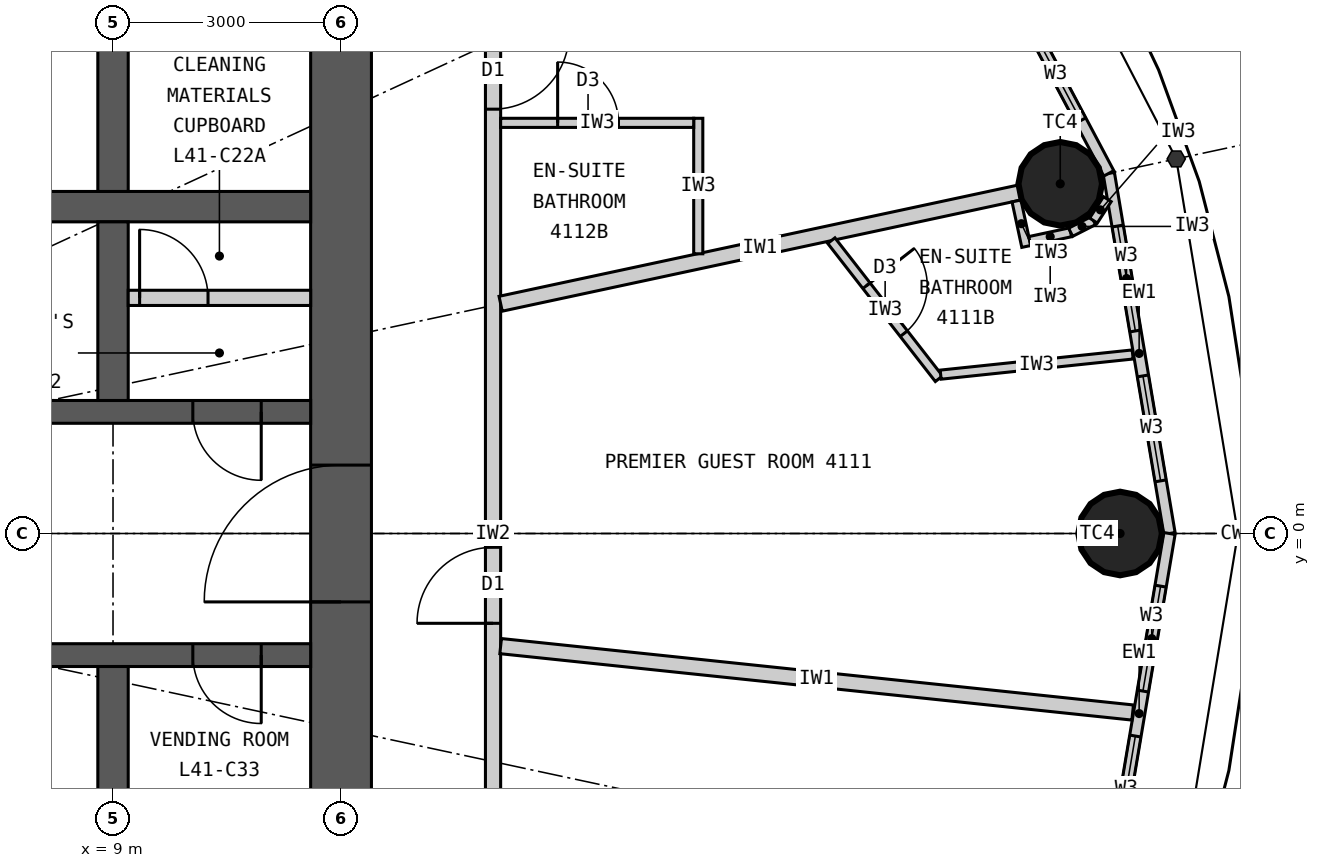
"""IFC4 building model, lengths in metres.
Left out: names, types, materials, properties, quantities, classifications, styles, units other than length and angle.
Written with IfcOpenShell. Run it as: python <this file> out.ifc"""

import sys

from ifc_helpers import new_model, si_unit, direction, frame, frame_2d, origin, origin_2d, place, context, subcontext, project, spatial, rectangle, circle, extrude, element, fill, save


model = new_model("IFC4")
c1 = context("Model", 3, precision=1e-05, world=origin(), true_north=direction((0.0, 1.0)))
c2 = subcontext(c1, "Body", "Model", "MODEL_VIEW")
j1 = project(units=[si_unit("LENGTHUNIT", "METRE"), si_unit("PLANEANGLEUNIT", "RADIAN")], contexts=[c1])
p1 = place(None, origin())
s1 = spatial("IfcSite", under=j1, at=p1, CompositionType="ELEMENT")
p2 = place(p1, origin())
s2 = spatial("IfcBuilding", under=s1, at=p2, CompositionType="ELEMENT")
p3 = place(p2, frame((0.0, 0.0, 156.6)))
s3 = spatial("IfcBuildingStorey", under=s2, at=p3, CompositionType="ELEMENT", Elevation=156.6)
for number, where, z_axis, x_axis in (
    (1, (22.25, 0.0, 0.0), (0.0, 0.0, 1.0), (1.0, 0.0, 0.0)),
    (2, (21.463, 4.601, 0.0), (0.0, 0.0, 1.0), (1.0, 0.0, 0.0)),
):
    element("IfcColumn", number, at=place(p3, frame(where, z_axis=z_axis, x_axis=x_axis)), inside=s3, PredefinedType="COLUMN", context=c2, shape_type="SweptSolid", body=[
        extrude(circle(Radius=0.55, at=origin_2d()), origin(), (0.0, 0.0, 1.0), 3.3),
    ])
p4 = place(p3, frame((12.0, -7.6, 0.0), z_axis=(0.0, 0.0, 1.0), x_axis=(0.0, 1.0, 0.0)))
e3 = element("IfcWall", 3, at=p4, inside=s3, PredefinedType="SHEAR", context=c2, shape_type="SweptSolid", body=[
    extrude(rectangle(XDim=15.2, YDim=0.8, at=frame_2d((7.6, 0.0))), origin(), (0.0, 0.0, 1.0), 3.3),
])
p5 = place(p4, frame((6.7, 0.0, 0.0)))
e4 = element("IfcOpeningElement", 4, at=p5, cuts=e3, PredefinedType="OPENING", context=c2, shape_type="SweptSolid", body=[
    extrude(rectangle(XDim=1.8, YDim=2.2, at=frame_2d((0.9, 1.1))), frame((0.0, 0.41, 0.0), z_axis=(0.0, -1.0, 0.0), x_axis=(1.0, 0.0, 0.0)), (0.0, 0.0, 1.0), 0.82),
])
p6 = place(p3, frame((-11.6, 4.3, 0.0), z_axis=(0.0, 0.0, 1.0), x_axis=(1.0, 0.0, 0.0)))
e5 = element("IfcWall", 5, at=p6, inside=s3, PredefinedType="SHEAR", context=c2, shape_type="SweptSolid", body=[
    extrude(rectangle(XDim=23.2, YDim=0.4, at=frame_2d((11.6, 0.0))), origin(), (0.0, 0.0, 1.0), 3.3),
])
p7 = place(p3, frame((-11.6, 1.6, 0.0), z_axis=(0.0, 0.0, 1.0), x_axis=(1.0, 0.0, 0.0)))
e6 = element("IfcWall", 6, at=p7, inside=s3, PredefinedType="SHEAR", context=c2, shape_type="SweptSolid", body=[
    extrude(rectangle(XDim=23.2, YDim=0.3, at=frame_2d((11.6, 0.0))), origin(), (0.0, 0.0, 1.0), 3.3),
])
p8 = place(p7, frame((9.55, 0.0, 0.0)))
e7 = element("IfcOpeningElement", 7, at=p8, cuts=e6, PredefinedType="OPENING", context=c2, shape_type="SweptSolid", body=[
    extrude(rectangle(XDim=1.1, YDim=2.2, at=frame_2d((0.55, 1.1))), frame((0.0, 0.16, 0.0), z_axis=(0.0, -1.0, 0.0), x_axis=(1.0, 0.0, 0.0)), (0.0, 0.0, 1.0), 0.32),
])
p9 = place(p7, frame((12.55, 0.0, 0.0)))
e8 = element("IfcOpeningElement", 8, at=p9, cuts=e6, PredefinedType="OPENING", context=c2, shape_type="SweptSolid", body=[
    extrude(rectangle(XDim=1.1, YDim=2.2, at=frame_2d((0.55, 1.1))), frame((0.0, 0.16, 0.0), z_axis=(0.0, -1.0, 0.0), x_axis=(1.0, 0.0, 0.0)), (0.0, 0.0, 1.0), 0.32),
])
p10 = place(p7, frame((0.65, 0.0, 0.0)))
e9 = element("IfcOpeningElement", 9, at=p10, cuts=e6, PredefinedType="OPENING", context=c2, shape_type="SweptSolid", body=[
    extrude(rectangle(XDim=0.9, YDim=2.2, at=frame_2d((0.45, 1.1))), frame((0.0, 0.16, 0.0), z_axis=(0.0, -1.0, 0.0), x_axis=(1.0, 0.0, 0.0)), (0.0, 0.0, 1.0), 0.32),
])
p11 = place(p7, frame((21.65, 0.0, 0.0)))
e10 = element("IfcOpeningElement", 10, at=p11, cuts=e6, PredefinedType="OPENING", context=c2, shape_type="SweptSolid", body=[
    extrude(rectangle(XDim=0.9, YDim=2.2, at=frame_2d((0.45, 1.1))), frame((0.0, 0.16, 0.0), z_axis=(0.0, -1.0, 0.0), x_axis=(1.0, 0.0, 0.0)), (0.0, 0.0, 1.0), 0.32),
])
p12 = place(p7, frame((3.65, 0.0, 0.0)))
e11 = element("IfcOpeningElement", 11, at=p12, cuts=e6, PredefinedType="OPENING", context=c2, shape_type="SweptSolid", body=[
    extrude(rectangle(XDim=0.9, YDim=2.2, at=frame_2d((0.45, 1.1))), frame((0.0, 0.16, 0.0), z_axis=(0.0, -1.0, 0.0), x_axis=(1.0, 0.0, 0.0)), (0.0, 0.0, 1.0), 0.32),
])
p13 = place(p7, frame((6.65, 0.0, 0.0)))
e12 = element("IfcOpeningElement", 12, at=p13, cuts=e6, PredefinedType="OPENING", context=c2, shape_type="SweptSolid", body=[
    extrude(rectangle(XDim=0.9, YDim=2.2, at=frame_2d((0.45, 1.1))), frame((0.0, 0.16, 0.0), z_axis=(0.0, -1.0, 0.0), x_axis=(1.0, 0.0, 0.0)), (0.0, 0.0, 1.0), 0.32),
])
p14 = place(p3, frame((-11.6, -1.6, 0.0), z_axis=(0.0, 0.0, 1.0), x_axis=(1.0, 0.0, 0.0)))
e13 = element("IfcWall", 13, at=p14, inside=s3, PredefinedType="SHEAR", context=c2, shape_type="SweptSolid", body=[
    extrude(rectangle(XDim=23.2, YDim=0.3, at=frame_2d((11.6, 0.0))), origin(), (0.0, 0.0, 1.0), 3.3),
])
p15 = place(p14, frame((9.55, 0.0, 0.0)))
e14 = element("IfcOpeningElement", 14, at=p15, cuts=e13, PredefinedType="OPENING", context=c2, shape_type="SweptSolid", body=[
    extrude(rectangle(XDim=1.1, YDim=2.2, at=frame_2d((0.55, 1.1))), frame((0.0, 0.16, 0.0), z_axis=(0.0, -1.0, 0.0), x_axis=(1.0, 0.0, 0.0)), (0.0, 0.0, 1.0), 0.32),
])
p16 = place(p14, frame((15.3, 0.0, 0.0)))
e15 = element("IfcOpeningElement", 15, at=p16, cuts=e13, PredefinedType="OPENING", context=c2, shape_type="SweptSolid", body=[
    extrude(rectangle(XDim=1.6, YDim=2.4, at=frame_2d((0.8, 1.2))), frame((0.0, 0.16, 0.0), z_axis=(0.0, -1.0, 0.0), x_axis=(1.0, 0.0, 0.0)), (0.0, 0.0, 1.0), 0.32),
])
p17 = place(p14, frame((0.65, 0.0, 0.0)))
e16 = element("IfcOpeningElement", 16, at=p17, cuts=e13, PredefinedType="OPENING", context=c2, shape_type="SweptSolid", body=[
    extrude(rectangle(XDim=0.9, YDim=2.2, at=frame_2d((0.45, 1.1))), frame((0.0, 0.16, 0.0), z_axis=(0.0, -1.0, 0.0), x_axis=(1.0, 0.0, 0.0)), (0.0, 0.0, 1.0), 0.32),
])
p18 = place(p14, frame((5.15, 0.0, 0.0)))
e17 = element("IfcOpeningElement", 17, at=p18, cuts=e13, PredefinedType="OPENING", context=c2, shape_type="SweptSolid", body=[
    extrude(rectangle(XDim=0.9, YDim=2.2, at=frame_2d((0.45, 1.1))), frame((0.0, 0.16, 0.0), z_axis=(0.0, -1.0, 0.0), x_axis=(1.0, 0.0, 0.0)), (0.0, 0.0, 1.0), 0.32),
])
p19 = place(p14, frame((21.65, 0.0, 0.0)))
e18 = element("IfcOpeningElement", 18, at=p19, cuts=e13, PredefinedType="OPENING", context=c2, shape_type="SweptSolid", body=[
    extrude(rectangle(XDim=0.9, YDim=2.2, at=frame_2d((0.45, 1.1))), frame((0.0, 0.16, 0.0), z_axis=(0.0, -1.0, 0.0), x_axis=(1.0, 0.0, 0.0)), (0.0, 0.0, 1.0), 0.32),
])
p20 = place(p3, frame((9.0, 4.5, 0.0), z_axis=(0.0, 0.0, 1.0), x_axis=(0.0, 1.0, 0.0)))
e19 = element("IfcWall", 19, at=p20, inside=s3, PredefinedType="SHEAR", context=c2, shape_type="SweptSolid", body=[
    extrude(rectangle(XDim=3.1, YDim=0.4, at=frame_2d((1.55, 0.0))), origin(), (0.0, 0.0, 1.0), 3.3),
])
for number, where, z_axis, x_axis in (
    (20, (9.0, 1.75, 0.0), (0.0, 0.0, 1.0), (0.0, 1.0, 0.0)),
    (21, (9.0, -4.1, 0.0), (0.0, 0.0, 1.0), (0.0, 1.0, 0.0)),
):
    element("IfcWall", number, at=place(p3, frame(where, z_axis=z_axis, x_axis=x_axis)), inside=s3, PredefinedType="SHEAR", context=c2, shape_type="SweptSolid", body=[
        extrude(rectangle(XDim=2.35, YDim=0.4, at=frame_2d((1.175, 0.0))), origin(), (0.0, 0.0, 1.0), 3.3),
    ])
p21 = place(p3, frame((22.9, 0.0, 0.0), z_axis=(0.0, 0.0, 1.0), x_axis=(-0.166162111254, 0.986098449843, 0.0)))
e22 = element("IfcWall", 22, at=p21, inside=s3, PredefinedType="ELEMENTEDWALL", context=c2, shape_type="SweptSolid", body=[
    extrude(rectangle(XDim=4.805, YDim=0.15, at=frame_2d((2.402, 0.0))), origin(), (0.0, 0.0, 1.0), 3.12),
])
p22 = place(p21, frame((0.702, 0.0, 0.9)))
e23 = element("IfcOpeningElement", 23, at=p22, cuts=e22, PredefinedType="OPENING", context=c2, shape_type="SweptSolid", body=[
    extrude(rectangle(XDim=1.4, YDim=1.9, at=frame_2d((0.7, 0.95))), frame((0.0, 0.085, 0.0), z_axis=(0.0, -1.0, 0.0), x_axis=(1.0, 0.0, 0.0)), (0.0, 0.0, 1.0), 0.17),
])
p23 = place(p21, frame((2.702, 0.0, 0.9)))
e24 = element("IfcOpeningElement", 24, at=p23, cuts=e22, PredefinedType="OPENING", context=c2, shape_type="SweptSolid", body=[
    extrude(rectangle(XDim=1.4, YDim=1.9, at=frame_2d((0.7, 0.95))), frame((0.0, 0.085, 0.0), z_axis=(0.0, -1.0, 0.0), x_axis=(1.0, 0.0, 0.0)), (0.0, 0.0, 1.0), 0.17),
])
p24 = place(p3, frame((22.102, 4.738, 0.0), z_axis=(0.0, 0.0, 1.0), x_axis=(-0.468428906714, 0.883501193748, 0.0)))
e25 = element("IfcWall", 25, at=p24, inside=s3, PredefinedType="ELEMENTEDWALL", context=c2, shape_type="SweptSolid", body=[
    extrude(rectangle(XDim=4.974, YDim=0.15, at=frame_2d((2.487, 0.0))), origin(), (0.0, 0.0, 1.0), 3.12),
])
p25 = place(p24, frame((0.787, 0.0, 0.9)))
e26 = element("IfcOpeningElement", 26, at=p25, cuts=e25, PredefinedType="OPENING", context=c2, shape_type="SweptSolid", body=[
    extrude(rectangle(XDim=1.4, YDim=1.9, at=frame_2d((0.7, 0.95))), frame((0.0, 0.085, 0.0), z_axis=(0.0, -1.0, 0.0), x_axis=(1.0, 0.0, 0.0)), (0.0, 0.0, 1.0), 0.17),
])
p26 = place(p24, frame((2.787, 0.0, 0.9)))
e27 = element("IfcOpeningElement", 27, at=p26, cuts=e25, PredefinedType="OPENING", context=c2, shape_type="SweptSolid", body=[
    extrude(rectangle(XDim=1.4, YDim=1.9, at=frame_2d((0.7, 0.95))), frame((0.0, 0.085, 0.0), z_axis=(0.0, -1.0, 0.0), x_axis=(1.0, 0.0, 0.0)), (0.0, 0.0, 1.0), 0.17),
])
p27 = place(p3, frame((22.102, -4.738, 0.0), z_axis=(0.0, 0.0, 1.0), x_axis=(0.166162111254, 0.986098449843, 0.0)))
e28 = element("IfcWall", 28, at=p27, inside=s3, PredefinedType="ELEMENTEDWALL", context=c2, shape_type="SweptSolid", body=[
    extrude(rectangle(XDim=4.805, YDim=0.15, at=frame_2d((2.402, 0.0))), origin(), (0.0, 0.0, 1.0), 3.12),
])
p28 = place(p27, frame((0.702, 0.0, 0.9)))
e29 = element("IfcOpeningElement", 29, at=p28, cuts=e28, PredefinedType="OPENING", context=c2, shape_type="SweptSolid", body=[
    extrude(rectangle(XDim=1.4, YDim=1.9, at=frame_2d((0.7, 0.95))), frame((0.0, 0.085, 0.0), z_axis=(0.0, -1.0, 0.0), x_axis=(1.0, 0.0, 0.0)), (0.0, 0.0, 1.0), 0.17),
])
p29 = place(p27, frame((2.702, 0.0, 0.9)))
e30 = element("IfcOpeningElement", 30, at=p29, cuts=e28, PredefinedType="OPENING", context=c2, shape_type="SweptSolid", body=[
    extrude(rectangle(XDim=1.4, YDim=1.9, at=frame_2d((0.7, 0.95))), frame((0.0, 0.085, 0.0), z_axis=(0.0, -1.0, 0.0), x_axis=(1.0, 0.0, 0.0)), (0.0, 0.0, 1.0), 0.17),
])
p30 = place(p3, frame((14.0, -9.9, 0.0), z_axis=(0.0, 0.0, 1.0), x_axis=(0.0, 1.0, 0.0)))
e31 = element("IfcWall", 31, at=p30, inside=s3, PredefinedType="PARTITIONING", context=c2, shape_type="SweptSolid", body=[
    extrude(rectangle(XDim=19.8, YDim=0.2, at=frame_2d((9.9, 0.0))), origin(), (0.0, 0.0, 1.0), 3.12),
])
p31 = place(p30, frame((3.824, 0.0, 0.0)))
e32 = element("IfcOpeningElement", 32, at=p31, cuts=e31, PredefinedType="OPENING", context=c2, shape_type="SweptSolid", body=[
    extrude(rectangle(XDim=1.0, YDim=2.2, at=frame_2d((0.5, 1.1))), frame((0.0, 0.11, 0.0), z_axis=(0.0, -1.0, 0.0), x_axis=(1.0, 0.0, 0.0)), (0.0, 0.0, 1.0), 0.22),
])
p32 = place(p30, frame((8.719, 0.0, 0.0)))
e33 = element("IfcOpeningElement", 33, at=p32, cuts=e31, PredefinedType="OPENING", context=c2, shape_type="SweptSolid", body=[
    extrude(rectangle(XDim=1.0, YDim=2.2, at=frame_2d((0.5, 1.1))), frame((0.0, 0.11, 0.0), z_axis=(0.0, -1.0, 0.0), x_axis=(1.0, 0.0, 0.0)), (0.0, 0.0, 1.0), 0.22),
])
p33 = place(p30, frame((15.482, 0.0, 0.0)))
e34 = element("IfcOpeningElement", 34, at=p33, cuts=e31, PredefinedType="OPENING", context=c2, shape_type="SweptSolid", body=[
    extrude(rectangle(XDim=1.0, YDim=2.2, at=frame_2d((0.5, 1.1))), frame((0.0, 0.11, 0.0), z_axis=(0.0, -1.0, 0.0), x_axis=(1.0, 0.0, 0.0)), (0.0, 0.0, 1.0), 0.22),
])
p34 = place(p3, frame((14.1, 3.022, 0.0), z_axis=(0.0, 0.0, 1.0), x_axis=(0.977790639684, 0.209584028367, 0.0)))
e35 = element("IfcWall", 35, at=p34, inside=s3, PredefinedType="PARTITIONING", context=c2, shape_type="SweptSolid", body=[
    extrude(rectangle(XDim=6.98, YDim=0.2, at=frame_2d((3.49, 0.0))), origin(), (0.0, 0.0, 1.0), 2.42),
])
p35 = place(p3, frame((14.1, -1.481, 0.0), z_axis=(0.0, 0.0, 1.0), x_axis=(0.994524794819, -0.104500873159, 0.0)))
e36 = element("IfcWall", 36, at=p35, inside=s3, PredefinedType="PARTITIONING", context=c2, shape_type="SweptSolid", body=[
    extrude(rectangle(XDim=8.362, YDim=0.2, at=frame_2d((4.181, 0.0))), origin(), (0.0, 0.0, 1.0), 2.47),
])
p36 = place(p3, frame((18.451, 3.853, 0.0), z_axis=(0.0, 0.0, 1.0), x_axis=(0.614703538382, -0.788758239197, 0.0)))
e37 = element("IfcWall", 37, at=p36, inside=s3, PredefinedType="PARTITIONING", context=c2, shape_type="SweptSolid", body=[
    extrude(rectangle(XDim=2.303, YDim=0.12, at=frame_2d((1.152, 0.0))), origin(), (0.0, 0.0, 1.0), 3.12),
])
p37 = place(p36, frame((0.752, 0.0, 0.0)))
e38 = element("IfcOpeningElement", 38, at=p37, cuts=e37, PredefinedType="OPENING", context=c2, shape_type="SweptSolid", body=[
    extrude(rectangle(XDim=0.8, YDim=2.1, at=frame_2d((0.4, 1.05))), frame((0.0, 0.07, 0.0), z_axis=(0.0, -1.0, 0.0), x_axis=(1.0, 0.0, 0.0)), (0.0, 0.0, 1.0), 0.14),
])
p38 = place(p3, frame((19.89, 2.09, 0.0), z_axis=(0.0, 0.0, 1.0), x_axis=(0.994527025269, 0.104479644, 0.0)))
e39 = element("IfcWall", 39, at=p38, inside=s3, PredefinedType="PARTITIONING", context=c2, shape_type="SweptSolid", body=[
    extrude(rectangle(XDim=2.54, YDim=0.12, at=frame_2d((1.27, 0.0))), origin(), (0.0, 0.0, 1.0), 3.12),
])
p39 = place(p3, frame((20.887, 4.375, 0.0), z_axis=(0.0, 0.0, 1.0), x_axis=(0.209746941802, -0.977755705892, 0.0)))
e40 = element("IfcWall", 40, at=p39, inside=s3, PredefinedType="PARTITIONING", context=c2, shape_type="SweptSolid", body=[
    extrude(rectangle(XDim=0.612, YDim=0.12, at=frame_2d((0.306, 0.0))), origin(), (0.0, 0.0, 1.0), 3.12),
])
p40 = place(p3, frame((21.062, 3.848, 0.0), z_axis=(0.0, 0.0, 1.0), x_axis=(0.977789415726, 0.209589738521, 0.0)))
e41 = element("IfcWall", 41, at=p40, inside=s3, PredefinedType="PARTITIONING", context=c2, shape_type="SweptSolid", body=[
    extrude(rectangle(XDim=0.55, YDim=0.12, at=frame_2d((0.275, 0.0))), origin(), (0.0, 0.0, 1.0), 3.12),
])
p41 = place(p3, frame((21.599, 3.963, 0.0), z_axis=(0.0, 0.0, 1.0), x_axis=(0.890193602875, 0.455582428766, 0.0)))
e42 = element("IfcWall", 42, at=p41, inside=s3, PredefinedType="PARTITIONING", context=c2, shape_type="SweptSolid", body=[
    extrude(rectangle(XDim=0.338, YDim=0.12, at=frame_2d((0.169, 0.0))), origin(), (0.0, 0.0, 1.0), 3.12),
])
p42 = place(p3, frame((21.9, 4.117, 0.0), z_axis=(0.0, 0.0, 1.0), x_axis=(0.543582688681, 0.839355622228, 0.0)))
e43 = element("IfcWall", 43, at=p42, inside=s3, PredefinedType="PARTITIONING", context=c2, shape_type="SweptSolid", body=[
    extrude(rectangle(XDim=0.336, YDim=0.12, at=frame_2d((0.168, 0.0))), origin(), (0.0, 0.0, 1.0), 3.12),
])
p43 = place(p3, frame((16.7, 3.68, 0.0), z_axis=(0.0, 0.0, 1.0), x_axis=(0.0, 1.0, 0.0)))
e44 = element("IfcWall", 44, at=p43, inside=s3, PredefinedType="PARTITIONING", context=c2, shape_type="SweptSolid", body=[
    extrude(rectangle(XDim=1.783, YDim=0.12, at=frame_2d((0.891, 0.0))), origin(), (0.0, 0.0, 1.0), 3.12),
])
p44 = place(p3, frame((14.1, 5.403, 0.0), z_axis=(0.0, 0.0, 1.0), x_axis=(1.0, 0.0, 0.0)))
e45 = element("IfcWall", 45, at=p44, inside=s3, PredefinedType="PARTITIONING", context=c2, shape_type="SweptSolid", body=[
    extrude(rectangle(XDim=2.54, YDim=0.12, at=frame_2d((1.27, 0.0))), origin(), (0.0, 0.0, 1.0), 3.12),
])
p45 = place(p44, frame((0.75, 0.0, 0.0)))
e46 = element("IfcOpeningElement", 46, at=p45, cuts=e45, PredefinedType="OPENING", context=c2, shape_type="SweptSolid", body=[
    extrude(rectangle(XDim=0.8, YDim=2.1, at=frame_2d((0.4, 1.05))), frame((0.0, 0.07, 0.0), z_axis=(0.0, -1.0, 0.0), x_axis=(1.0, 0.0, 0.0)), (0.0, 0.0, 1.0), 0.14),
])
p46 = place(p3, frame((9.2, 3.1, 0.0), z_axis=(0.0, 0.0, 1.0), x_axis=(1.0, 0.0, 0.0)))
e47 = element("IfcWall", 47, at=p46, inside=s3, PredefinedType="PARTITIONING", context=c2, shape_type="SweptSolid", body=[
    extrude(rectangle(XDim=2.4, YDim=0.2, at=frame_2d((1.2, 0.0))), origin(), (0.0, 0.0, 1.0), 3.12),
])
p47 = place(p46, frame((0.15, 0.0, 0.0)))
e48 = element("IfcOpeningElement", 48, at=p47, cuts=e47, PredefinedType="OPENING", context=c2, shape_type="SweptSolid", body=[
    extrude(rectangle(XDim=0.9, YDim=2.2, at=frame_2d((0.45, 1.1))), frame((0.0, 0.11, 0.0), z_axis=(0.0, -1.0, 0.0), x_axis=(1.0, 0.0, 0.0)), (0.0, 0.0, 1.0), 0.22),
])
p48 = place(p22, origin())
e49 = element("IfcWindow", 49, at=p48, inside=s3, PartitioningType="SINGLE_PANEL", PredefinedType="WINDOW", context=c2, shape_type="SweptSolid", body=[
    extrude(rectangle(XDim=1.4, YDim=1.9, at=frame_2d((0.7, 0.95))), frame((0.0, 0.03, 0.0), z_axis=(0.0, -1.0, 0.0), x_axis=(1.0, 0.0, 0.0)), (0.0, 0.0, 1.0), 0.06),
])
fill(e23, e49)
p49 = place(p23, origin())
e50 = element("IfcWindow", 50, at=p49, inside=s3, PartitioningType="SINGLE_PANEL", PredefinedType="WINDOW", context=c2, shape_type="SweptSolid", body=[
    extrude(rectangle(XDim=1.4, YDim=1.9, at=frame_2d((0.7, 0.95))), frame((0.0, 0.03, 0.0), z_axis=(0.0, -1.0, 0.0), x_axis=(1.0, 0.0, 0.0)), (0.0, 0.0, 1.0), 0.06),
])
fill(e24, e50)
p50 = place(p25, origin())
e51 = element("IfcWindow", 51, at=p50, inside=s3, PartitioningType="SINGLE_PANEL", PredefinedType="WINDOW", context=c2, shape_type="SweptSolid", body=[
    extrude(rectangle(XDim=1.4, YDim=1.9, at=frame_2d((0.7, 0.95))), frame((0.0, 0.03, 0.0), z_axis=(0.0, -1.0, 0.0), x_axis=(1.0, 0.0, 0.0)), (0.0, 0.0, 1.0), 0.06),
])
fill(e26, e51)
p51 = place(p28, origin())
e52 = element("IfcWindow", 52, at=p51, inside=s3, PartitioningType="SINGLE_PANEL", PredefinedType="WINDOW", context=c2, shape_type="SweptSolid", body=[
    extrude(rectangle(XDim=1.4, YDim=1.9, at=frame_2d((0.7, 0.95))), frame((0.0, 0.03, 0.0), z_axis=(0.0, -1.0, 0.0), x_axis=(1.0, 0.0, 0.0)), (0.0, 0.0, 1.0), 0.06),
])
fill(e29, e52)
p52 = place(p29, origin())
e53 = element("IfcWindow", 53, at=p52, inside=s3, PartitioningType="SINGLE_PANEL", PredefinedType="WINDOW", context=c2, shape_type="SweptSolid", body=[
    extrude(rectangle(XDim=1.4, YDim=1.9, at=frame_2d((0.7, 0.95))), frame((0.0, 0.03, 0.0), z_axis=(0.0, -1.0, 0.0), x_axis=(1.0, 0.0, 0.0)), (0.0, 0.0, 1.0), 0.06),
])
fill(e30, e53)
p53 = place(p37, origin())
e54 = element("IfcDoor", 54, at=p53, inside=s3, OperationType="SINGLE_SWING_LEFT", PredefinedType="DOOR", context=c2, shape_type="SweptSolid", body=[
    extrude(rectangle(XDim=0.8, YDim=2.1, at=frame_2d((0.4, 1.05))), frame((0.0, 0.025, 0.0), z_axis=(0.0, -1.0, 0.0), x_axis=(1.0, 0.0, 0.0)), (0.0, 0.0, 1.0), 0.05),
])
fill(e38, e54)
p54 = place(p32, origin())
e55 = element("IfcDoor", 55, at=p54, inside=s3, OperationType="SINGLE_SWING_LEFT", PredefinedType="DOOR", context=c2, shape_type="SweptSolid", body=[
    extrude(rectangle(XDim=1.0, YDim=2.2, at=frame_2d((0.5, 1.1))), frame((0.0, 0.025, 0.0), z_axis=(0.0, -1.0, 0.0), x_axis=(1.0, 0.0, 0.0)), (0.0, 0.0, 1.0), 0.05),
])
fill(e33, e55)
p55 = place(p45, origin())
e56 = element("IfcDoor", 56, at=p55, inside=s3, OperationType="SINGLE_SWING_LEFT", PredefinedType="DOOR", context=c2, shape_type="SweptSolid", body=[
    extrude(rectangle(XDim=0.8, YDim=2.1, at=frame_2d((0.4, 1.05))), frame((0.0, 0.025, 0.0), z_axis=(0.0, -1.0, 0.0), x_axis=(1.0, 0.0, 0.0)), (0.0, 0.0, 1.0), 0.05),
])
fill(e46, e56)
p56 = place(p33, origin())
e57 = element("IfcDoor", 57, at=p56, inside=s3, OperationType="SINGLE_SWING_RIGHT", PredefinedType="DOOR", context=c2, shape_type="SweptSolid", body=[
    extrude(rectangle(XDim=1.0, YDim=2.2, at=frame_2d((0.5, 1.1))), frame((0.0, 0.025, 0.0), z_axis=(0.0, -1.0, 0.0), x_axis=(1.0, 0.0, 0.0)), (0.0, 0.0, 1.0), 0.05),
])
fill(e34, e57)
p57 = place(p47, origin())
e58 = element("IfcDoor", 58, at=p57, inside=s3, OperationType="SINGLE_SWING_LEFT", PredefinedType="DOOR", context=c2, shape_type="SweptSolid", body=[
    extrude(rectangle(XDim=0.9, YDim=2.2, at=frame_2d((0.45, 1.1))), frame((0.0, 0.025, 0.0), z_axis=(0.0, -1.0, 0.0), x_axis=(1.0, 0.0, 0.0)), (0.0, 0.0, 1.0), 0.05),
])
fill(e48, e58)
p58 = place(p11, origin())
e59 = element("IfcDoor", 59, at=p58, inside=s3, OperationType="SINGLE_SWING_RIGHT", PredefinedType="DOOR", context=c2, shape_type="SweptSolid", body=[
    extrude(rectangle(XDim=0.9, YDim=2.2, at=frame_2d((0.45, 1.1))), frame((0.0, 0.025, 0.0), z_axis=(0.0, -1.0, 0.0), x_axis=(1.0, 0.0, 0.0)), (0.0, 0.0, 1.0), 0.05),
])
fill(e10, e59)
p59 = place(p19, origin())
e60 = element("IfcDoor", 60, at=p59, inside=s3, OperationType="SINGLE_SWING_RIGHT", PredefinedType="DOOR", context=c2, shape_type="SweptSolid", body=[
    extrude(rectangle(XDim=0.9, YDim=2.2, at=frame_2d((0.45, 1.1))), frame((0.0, 0.025, 0.0), z_axis=(0.0, -1.0, 0.0), x_axis=(1.0, 0.0, 0.0)), (0.0, 0.0, 1.0), 0.05),
])
fill(e18, e60)
p60 = place(p5, origin())
e61 = element("IfcDoor", 61, at=p60, inside=s3, OperationType="DOUBLE_DOOR_DOUBLE_SWING", PredefinedType="DOOR", context=c2, shape_type="SweptSolid", body=[
    extrude(rectangle(XDim=1.8, YDim=2.2, at=frame_2d((0.9, 1.1))), frame((0.0, 0.025, 0.0), z_axis=(0.0, -1.0, 0.0), x_axis=(1.0, 0.0, 0.0)), (0.0, 0.0, 1.0), 0.05),
])
fill(e4, e61)
save(model, sys.argv[1])
